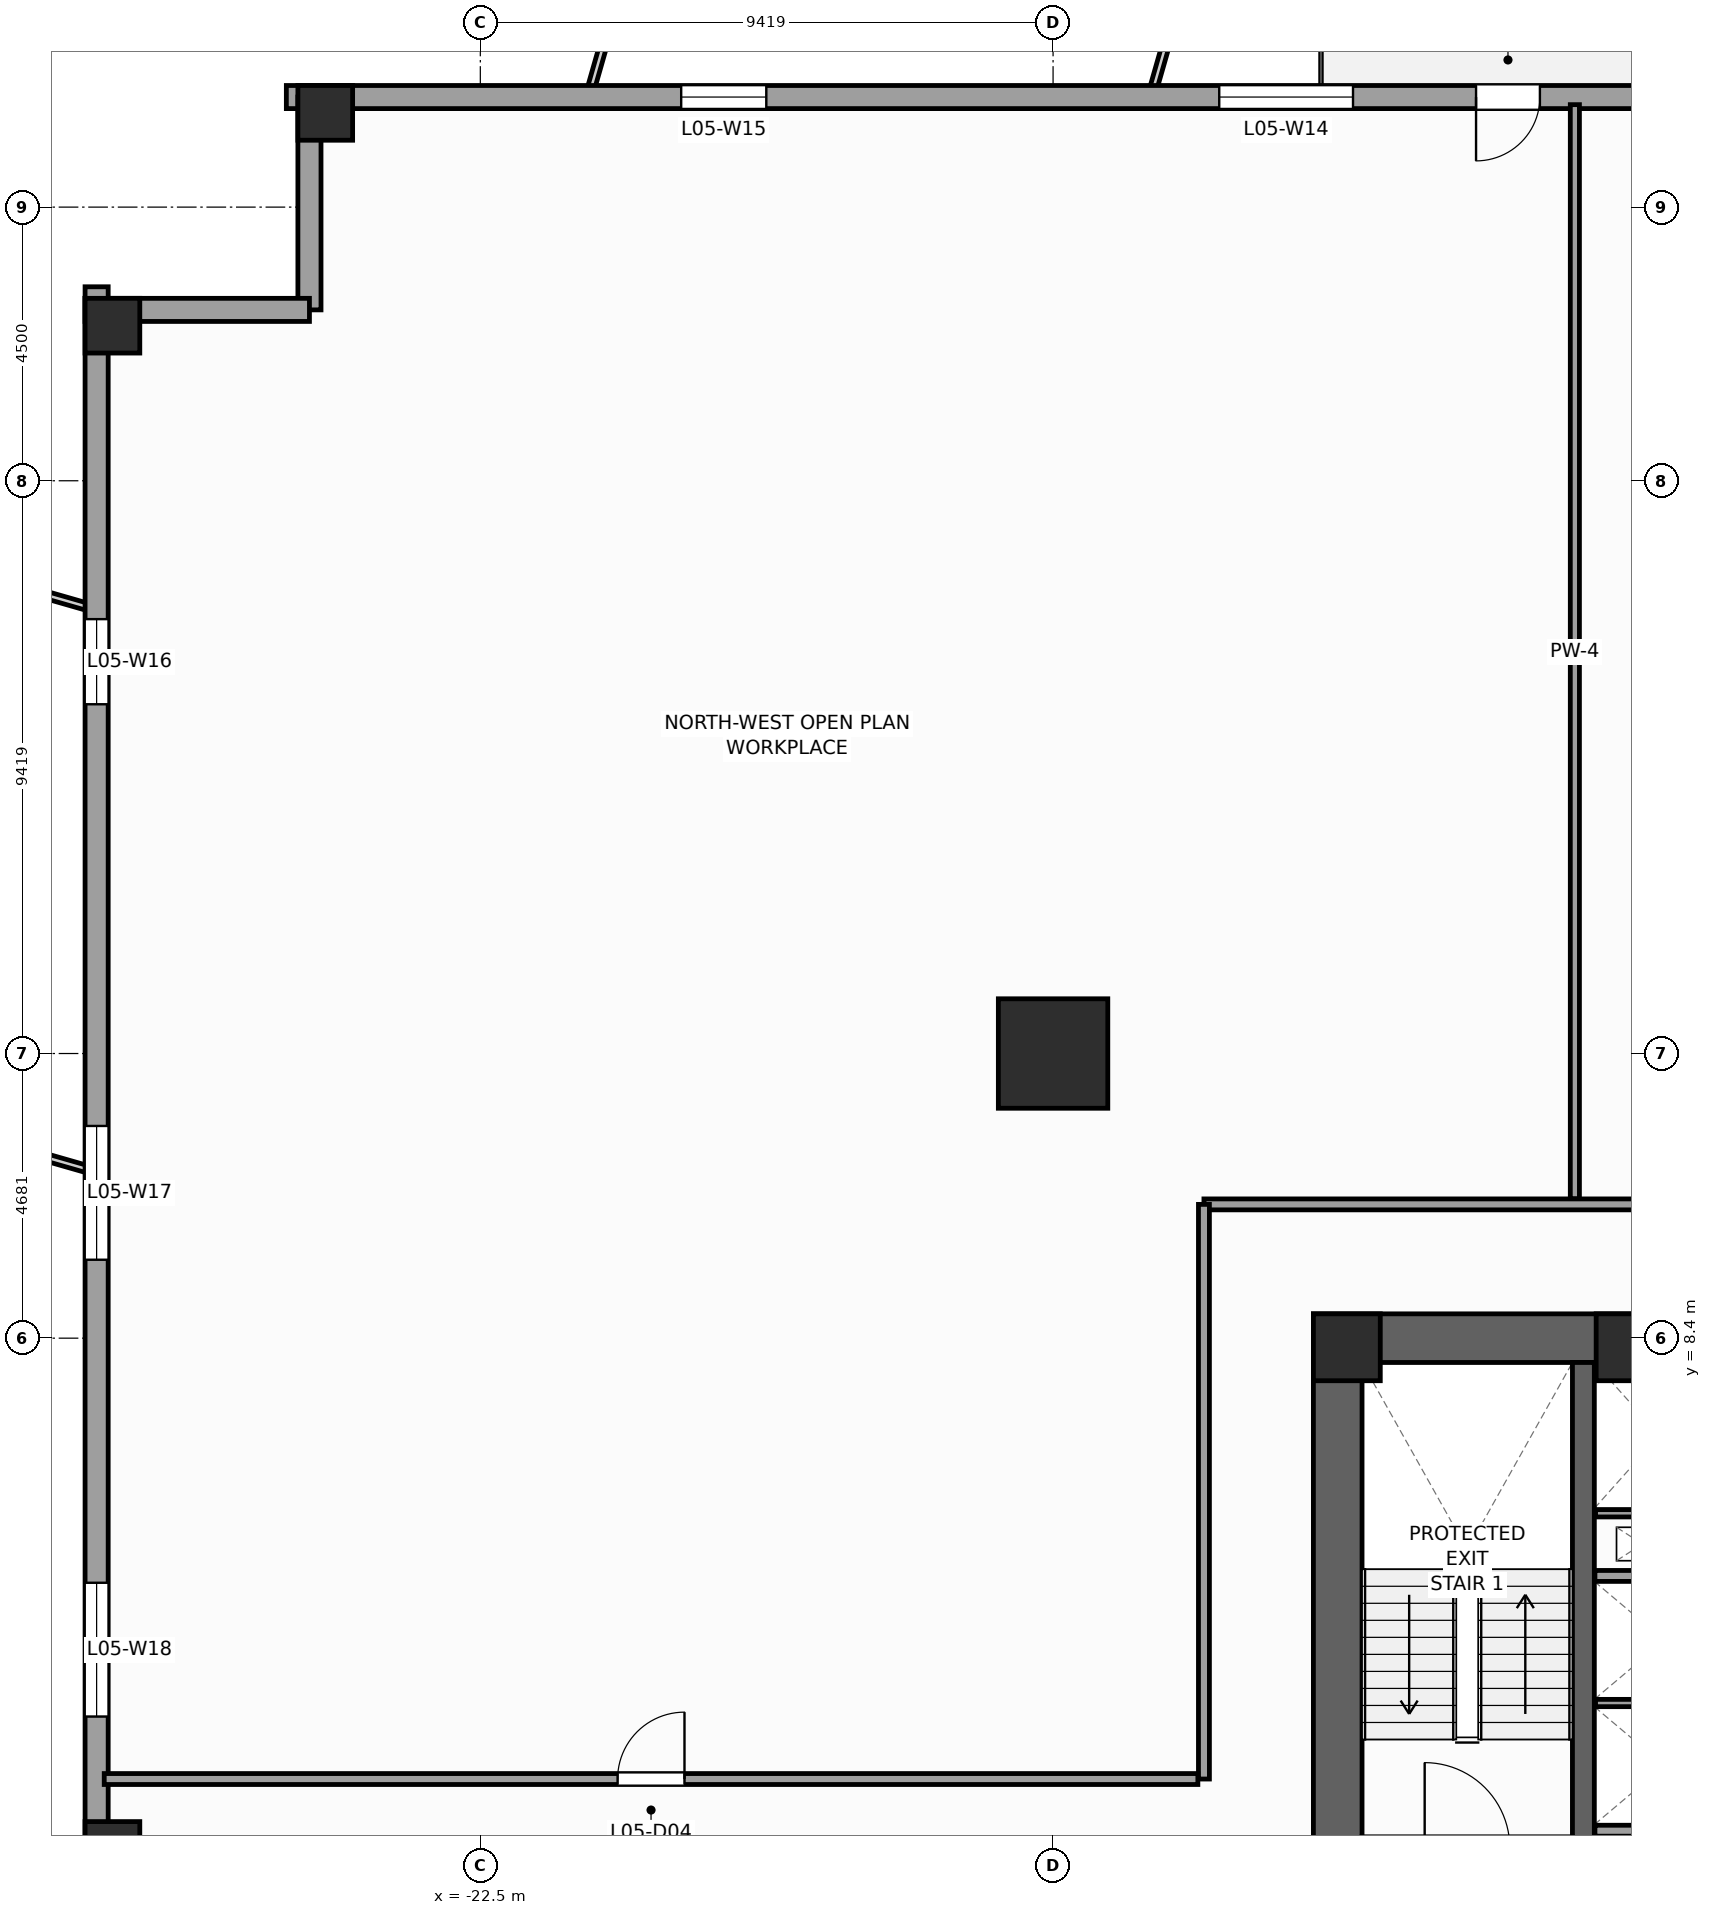
"""IFC4 building model, lengths in metres.
Left out: names, types, materials, properties, quantities, classifications, styles, units other than length and angle.
Written with IfcOpenShell. Run it as: python <this file> out.ifc"""

import sys

from ifc_helpers import new_model, si_unit, direction, frame, frame_2d, origin, origin_2d, place, context, subcontext, project, spatial, rectangle, extrude, source, transform, mapped, element, fill, save


model = new_model("IFC4")
c1 = context("Model", 3, precision=1e-05, world=origin(), true_north=direction((0.0, 1.0)))
c2 = subcontext(c1, "Body", "Model", "MODEL_VIEW")
j1 = project(units=[si_unit("LENGTHUNIT", "METRE"), si_unit("PLANEANGLEUNIT", "RADIAN")], contexts=[c1])
p1 = place(None, origin())
s1 = spatial("IfcSite", under=j1, at=p1, CompositionType="ELEMENT")
p2 = place(p1, origin())
s2 = spatial("IfcBuilding", under=s1, at=p2, CompositionType="ELEMENT")
p3 = place(p2, frame((0.0, 0.0, 26.0)))
s3 = spatial("IfcBuildingStorey", under=s2, at=p3, CompositionType="ELEMENT", Elevation=26.0)
p4 = place(p3, frame((-8.8, 8.4, 0.0), z_axis=(0.0, 0.0, 1.0), x_axis=(1.0, 0.0, 0.0)))
e1 = element("IfcWall", 1, at=p4, inside=s3, PredefinedType="SHEAR", context=c2, shape_type="SweptSolid", body=[
    extrude(rectangle(XDim=17.6, YDim=0.8, at=frame_2d((8.8, 0.0))), origin(), (0.0, 0.0, 1.0), 4.0),
])
p5 = place(p3, frame((-8.4, -8.0, 0.0), z_axis=(0.0, 0.0, 1.0), x_axis=(0.0, 1.0, 0.0)))
e2 = element("IfcWall", 2, at=p5, inside=s3, PredefinedType="SHEAR", context=c2, shape_type="SweptSolid", body=[
    extrude(rectangle(XDim=16.0, YDim=0.8, at=frame_2d((8.0, 0.0))), origin(), (0.0, 0.0, 1.0), 4.0),
])
p6 = place(p5, frame((4.69, 0.0, 0.0)))
e3 = element("IfcOpeningElement", 3, at=p6, cuts=e2, PredefinedType="OPENING", context=c2, shape_type="SweptSolid", body=[
    extrude(rectangle(XDim=1.3, YDim=2.2, at=frame_2d((0.65, 1.1))), frame((0.0, 0.41, 0.0), z_axis=(0.0, -1.0, 0.0), x_axis=(1.0, 0.0, 0.0)), (0.0, 0.0, 1.0), 0.82),
])
p7 = place(p3, frame((-4.36, -8.0, 0.0), z_axis=(0.0, 0.0, 1.0), x_axis=(0.0, 1.0, 0.0)))
e4 = element("IfcWall", 4, at=p7, inside=s3, PredefinedType="SHEAR", context=c2, shape_type="SweptSolid", body=[
    extrude(rectangle(XDim=16.0, YDim=0.36, at=frame_2d((8.0, 0.0))), origin(), (0.0, 0.0, 1.0), 4.0),
])
m1 = source(origin(), c2, "Body", "SweptSolid", [
    extrude(rectangle(XDim=1.1, YDim=1.1, at=origin_2d()), origin(), (0.0, 0.0, 1.0), 4.0),
])
for number, where, z_axis, x_axis in (
    (5, (-8.25, 8.25, 0.0), (0.0, 0.0, 1.0), (1.0, 0.0, 0.0)),
    (6, (-3.6, 8.25, 0.0), (0.0, 0.0, 1.0), (1.0, 0.0, 0.0)),
):
    element("IfcColumn", number, at=place(p3, frame(where, z_axis=z_axis, x_axis=x_axis)), inside=s3, PredefinedType="PILASTER", context=c2, shape_type="MappedRepresentation", body=[
        mapped(m1, transform((0.0, 0.0, 0.0), scale=1.0)),
    ])
m2 = source(origin(), c2, "Body", "SweptSolid", [
    extrude(rectangle(XDim=1.8, YDim=1.8, at=origin_2d()), origin(), (0.0, 0.0, 1.0), 4.0),
])
p8 = place(p3, frame((-13.081, 13.081, 0.0), z_axis=(0.0, 0.0, 1.0), x_axis=(1.0, 0.0, 0.0)))
e7 = element("IfcColumn", 7, at=p8, inside=s3, PredefinedType="COLUMN", context=c2, shape_type="MappedRepresentation", body=[
    mapped(m2, transform((0.0, 0.0, 0.0), scale=1.0)),
])
m3 = source(origin(), c2, "Body", "SweptSolid", [
    extrude(rectangle(XDim=0.9, YDim=0.9, at=origin_2d()), origin(), (0.0, 0.0, 1.0), 4.0),
])
for number, where, z_axis, x_axis in (
    (8, (-25.05, 28.55, 0.0), (0.0, 0.0, 1.0), (1.0, 0.0, 0.0)),
    (9, (-28.55, 25.05, 0.0), (0.0, 0.0, 1.0), (1.0, 0.0, 0.0)),
    (10, (-28.55, 0.0, 0.0), (0.0, 0.0, 1.0), (1.0, 0.0, 0.0)),
):
    element("IfcColumn", number, at=place(p3, frame(where, z_axis=z_axis, x_axis=x_axis)), inside=s3, PredefinedType="COLUMN", context=c2, shape_type="MappedRepresentation", body=[
        mapped(m3, transform((0.0, 0.0, 0.0), scale=1.0)),
    ])
p9 = place(p3, frame((25.69, 28.81, 0.0), z_axis=(0.0, 0.0, 1.0), x_axis=(-1.0, 0.0, 0.0)))
e11 = element("IfcWall", 11, at=p9, inside=s3, PredefinedType="STANDARD", context=c2, shape_type="SweptSolid", body=[
    extrude(rectangle(XDim=51.38, YDim=0.38, at=frame_2d((25.69, 0.0))), origin(), (0.0, 0.0, 1.0), 3.12),
])
p10 = place(p9, frame((30.765, 0.0, 0.0)))
e12 = element("IfcOpeningElement", 12, at=p10, cuts=e11, PredefinedType="OPENING", context=c2, shape_type="SweptSolid", body=[
    extrude(rectangle(XDim=1.05, YDim=2.25, at=frame_2d((0.525, 1.125))), frame((0.0, 0.2, 0.0), z_axis=(0.0, -1.0, 0.0), x_axis=(1.0, 0.0, 0.0)), (0.0, 0.0, 1.0), 0.4),
])
p11 = place(p9, frame((5.466, 0.0, 0.49)))
e13 = element("IfcOpeningElement", 13, at=p11, cuts=e11, PredefinedType="OPENING", context=c2, shape_type="SweptSolid", body=[
    extrude(rectangle(XDim=1.4, YDim=2.4, at=frame_2d((0.7, 1.2))), frame((0.0, 0.2, 0.0), z_axis=(0.0, -1.0, 0.0), x_axis=(1.0, 0.0, 0.0)), (0.0, 0.0, 1.0), 0.4),
])
p12 = place(p9, frame((13.8, 0.0, 0.49)))
e14 = element("IfcOpeningElement", 14, at=p12, cuts=e11, PredefinedType="OPENING", context=c2, shape_type="SweptSolid", body=[
    extrude(rectangle(XDim=2.2, YDim=2.4, at=frame_2d((1.1, 1.2))), frame((0.0, 0.2, 0.0), z_axis=(0.0, -1.0, 0.0), x_axis=(1.0, 0.0, 0.0)), (0.0, 0.0, 1.0), 0.4),
])
p13 = place(p9, frame((22.062, 0.0, 0.49)))
e15 = element("IfcOpeningElement", 15, at=p13, cuts=e11, PredefinedType="OPENING", context=c2, shape_type="SweptSolid", body=[
    extrude(rectangle(XDim=2.2, YDim=2.4, at=frame_2d((1.1, 1.2))), frame((0.0, 0.2, 0.0), z_axis=(0.0, -1.0, 0.0), x_axis=(1.0, 0.0, 0.0)), (0.0, 0.0, 1.0), 0.4),
])
p14 = place(p9, frame((33.838, 0.0, 0.49)))
e16 = element("IfcOpeningElement", 16, at=p14, cuts=e11, PredefinedType="OPENING", context=c2, shape_type="SweptSolid", body=[
    extrude(rectangle(XDim=2.2, YDim=2.4, at=frame_2d((1.1, 1.2))), frame((0.0, 0.2, 0.0), z_axis=(0.0, -1.0, 0.0), x_axis=(1.0, 0.0, 0.0)), (0.0, 0.0, 1.0), 0.4),
])
p15 = place(p9, frame((43.487, 0.0, 0.49)))
e17 = element("IfcOpeningElement", 17, at=p15, cuts=e11, PredefinedType="OPENING", context=c2, shape_type="SweptSolid", body=[
    extrude(rectangle(XDim=1.4, YDim=2.4, at=frame_2d((0.7, 1.2))), frame((0.0, 0.2, 0.0), z_axis=(0.0, -1.0, 0.0), x_axis=(1.0, 0.0, 0.0)), (0.0, 0.0, 1.0), 0.4),
])
p16 = place(p3, frame((-25.31, 28.81, 0.0), z_axis=(0.0, 0.0, 1.0), x_axis=(0.0, -1.0, 0.0)))
e18 = element("IfcWall", 18, at=p16, inside=s3, PredefinedType="STANDARD", context=c2, shape_type="SweptSolid", body=[
    extrude(rectangle(XDim=3.5, YDim=0.38, at=frame_2d((1.75, 0.0))), origin(), (0.0, 0.0, 1.0), 3.72),
])
p17 = place(p3, frame((-25.31, 25.31, 0.0), z_axis=(0.0, 0.0, 1.0), x_axis=(-1.0, 0.0, 0.0)))
e19 = element("IfcWall", 19, at=p17, inside=s3, PredefinedType="STANDARD", context=c2, shape_type="SweptSolid", body=[
    extrude(rectangle(XDim=3.69, YDim=0.38, at=frame_2d((1.845, 0.0))), origin(), (0.0, 0.0, 1.0), 3.72),
])
p18 = place(p3, frame((-28.81, 25.69, 0.0), z_axis=(0.0, 0.0, 1.0), x_axis=(0.0, -1.0, 0.0)))
e20 = element("IfcWall", 20, at=p18, inside=s3, PredefinedType="STANDARD", context=c2, shape_type="SweptSolid", body=[
    extrude(rectangle(XDim=51.38, YDim=0.38, at=frame_2d((25.69, 0.0))), origin(), (0.0, 0.0, 1.0), 3.12),
])
p19 = place(p18, frame((5.466, 0.0, 0.49)))
e21 = element("IfcOpeningElement", 21, at=p19, cuts=e20, PredefinedType="OPENING", context=c2, shape_type="SweptSolid", body=[
    extrude(rectangle(XDim=1.4, YDim=2.4, at=frame_2d((0.7, 1.2))), frame((0.0, 0.2, 0.0), z_axis=(0.0, -1.0, 0.0), x_axis=(1.0, 0.0, 0.0)), (0.0, 0.0, 1.0), 0.4),
])
p20 = place(p18, frame((13.8, 0.0, 0.49)))
e22 = element("IfcOpeningElement", 22, at=p20, cuts=e20, PredefinedType="OPENING", context=c2, shape_type="SweptSolid", body=[
    extrude(rectangle(XDim=2.2, YDim=2.4, at=frame_2d((1.1, 1.2))), frame((0.0, 0.2, 0.0), z_axis=(0.0, -1.0, 0.0), x_axis=(1.0, 0.0, 0.0)), (0.0, 0.0, 1.0), 0.4),
])
p21 = place(p18, frame((21.312, 0.0, 0.49)))
e23 = element("IfcOpeningElement", 23, at=p21, cuts=e20, PredefinedType="OPENING", context=c2, shape_type="SweptSolid", body=[
    extrude(rectangle(XDim=2.2, YDim=2.4, at=frame_2d((1.1, 1.2))), frame((0.0, 0.2, 0.0), z_axis=(0.0, -1.0, 0.0), x_axis=(1.0, 0.0, 0.0)), (0.0, 0.0, 1.0), 0.4),
])
p22 = place(p18, frame((33.838, 0.0, 0.49)))
e24 = element("IfcOpeningElement", 24, at=p22, cuts=e20, PredefinedType="OPENING", context=c2, shape_type="SweptSolid", body=[
    extrude(rectangle(XDim=2.2, YDim=2.4, at=frame_2d((1.1, 1.2))), frame((0.0, 0.2, 0.0), z_axis=(0.0, -1.0, 0.0), x_axis=(1.0, 0.0, 0.0)), (0.0, 0.0, 1.0), 0.4),
])
p23 = place(p18, frame((43.487, 0.0, 0.49)))
e25 = element("IfcOpeningElement", 25, at=p23, cuts=e20, PredefinedType="OPENING", context=c2, shape_type="SweptSolid", body=[
    extrude(rectangle(XDim=1.4, YDim=2.4, at=frame_2d((0.7, 1.2))), frame((0.0, 0.2, 0.0), z_axis=(0.0, -1.0, 0.0), x_axis=(1.0, 0.0, 0.0)), (0.0, 0.0, 1.0), 0.4),
])
for number, where, z_axis, x_axis in (
    (26, (-4.17, 0.3, 0.0), (0.0, 0.0, 1.0), (1.0, 0.0, 0.0)),
    (27, (-4.17, 4.49, 0.0), (0.0, 0.0, 1.0), (1.0, 0.0, 0.0)),
):
    element("IfcWall", number, at=place(p3, frame(where, z_axis=z_axis, x_axis=x_axis)), inside=s3, PredefinedType="PARTITIONING", context=c2, shape_type="SweptSolid", body=[
        extrude(rectangle(XDim=2.28, YDim=0.18, at=frame_2d((1.14, 0.0))), origin(), (0.0, 0.0, 1.0), 3.72),
    ])
p24 = place(p3, frame((-4.16, 2.4, 0.0), z_axis=(0.0, 0.0, 1.0), x_axis=(1.0, 0.0, 0.0)))
e28 = element("IfcWall", 28, at=p24, inside=s3, PredefinedType="PARTITIONING", context=c2, shape_type="SweptSolid", body=[
    extrude(rectangle(XDim=2.26, YDim=0.12, at=frame_2d((1.13, 0.0))), origin(), (0.0, 0.0, 1.0), 3.72),
])
p25 = place(p3, frame((-4.16, 5.52, 0.0), z_axis=(0.0, 0.0, 1.0), x_axis=(1.0, 0.0, 0.0)))
e29 = element("IfcWall", 29, at=p25, inside=s3, PredefinedType="PARTITIONING", context=c2, shape_type="SweptSolid", body=[
    extrude(rectangle(XDim=2.1, YDim=0.12, at=frame_2d((1.05, 0.0))), origin(), (0.0, 0.0, 1.0), 3.72),
])
p26 = place(p3, frame((-10.6, 10.6, 0.0), z_axis=(0.0, 0.0, 1.0), x_axis=(1.0, 0.0, 0.0)))
e30 = element("IfcWall", 30, at=p26, inside=s3, PredefinedType="PARTITIONING", context=c2, shape_type="SweptSolid", body=[
    extrude(rectangle(XDim=21.2, YDim=0.18, at=frame_2d((10.6, 0.0))), origin(), (0.0, 0.0, 1.0), 3.72),
])
p27 = place(p26, frame((10.05, 0.0, 0.0)))
e31 = element("IfcOpeningElement", 31, at=p27, cuts=e30, PredefinedType="OPENING", context=c2, shape_type="SweptSolid", body=[
    extrude(rectangle(XDim=1.1, YDim=2.2, at=frame_2d((0.55, 1.1))), frame((0.0, 0.1, 0.0), z_axis=(0.0, -1.0, 0.0), x_axis=(1.0, 0.0, 0.0)), (0.0, 0.0, 1.0), 0.2),
])
p28 = place(p3, frame((-10.6, 1.15, 0.0), z_axis=(0.0, 0.0, 1.0), x_axis=(0.0, 1.0, 0.0)))
e32 = element("IfcWall", 32, at=p28, inside=s3, PredefinedType="PARTITIONING", context=c2, shape_type="SweptSolid", body=[
    extrude(rectangle(XDim=9.45, YDim=0.18, at=frame_2d((4.725, 0.0))), origin(), (0.0, 0.0, 1.0), 3.72),
])
p29 = place(p3, frame((-28.685, 1.15, 0.0), z_axis=(0.0, 0.0, 1.0), x_axis=(1.0, 0.0, 0.0)))
e33 = element("IfcWall", 33, at=p29, inside=s3, PredefinedType="PARTITIONING", context=c2, shape_type="SweptSolid", body=[
    extrude(rectangle(XDim=17.985, YDim=0.18, at=frame_2d((8.993, 0.0))), origin(), (0.0, 0.0, 1.0), 3.72),
])
p30 = place(p29, frame((8.442, 0.0, 0.0)))
e34 = element("IfcOpeningElement", 34, at=p30, cuts=e33, PredefinedType="OPENING", context=c2, shape_type="SweptSolid", body=[
    extrude(rectangle(XDim=1.1, YDim=2.2, at=frame_2d((0.55, 1.1))), frame((0.0, 0.1, 0.0), z_axis=(0.0, -1.0, 0.0), x_axis=(1.0, 0.0, 0.0)), (0.0, 0.0, 1.0), 0.2),
])
p31 = place(p3, frame((-4.5, 10.695, 0.0), z_axis=(0.0, 0.0, 1.0), x_axis=(0.0, 1.0, 0.0)))
e35 = element("IfcWall", 35, at=p31, inside=s3, PredefinedType="PARTITIONING", context=c2, shape_type="SweptSolid", body=[
    extrude(rectangle(XDim=17.99, YDim=0.15, at=frame_2d((8.995, 0.0))), origin(), (0.0, 0.0, 1.0), 3.72),
])
m4 = source(origin(), c2, "Body", "SweptSolid", [
    extrude(rectangle(XDim=1.05, YDim=2.25, at=frame_2d((0.525, 1.125))), frame((0.0, 0.025, 0.0), z_axis=(0.0, -1.0, 0.0), x_axis=(1.0, 0.0, 0.0)), (0.0, 0.0, 1.0), 0.05),
])
p32 = place(p10, origin())
e36 = element("IfcDoor", 36, at=p32, inside=s3, OperationType="SINGLE_SWING_RIGHT", PredefinedType="DOOR", context=c2, shape_type="MappedRepresentation", body=[
    mapped(m4, transform((0.0, 0.0, 0.0), scale=1.0)),
])
fill(e12, e36)
m5 = source(origin(), c2, "Body", "SweptSolid", [
    extrude(rectangle(XDim=2.2, YDim=2.4, at=frame_2d((1.1, 1.2))), frame((0.0, 0.03, 0.0), z_axis=(0.0, -1.0, 0.0), x_axis=(1.0, 0.0, 0.0)), (0.0, 0.0, 1.0), 0.06),
])
p33 = place(p14, origin())
e37 = element("IfcWindow", 37, at=p33, inside=s3, PartitioningType="SINGLE_PANEL", PredefinedType="WINDOW", context=c2, shape_type="MappedRepresentation", body=[
    mapped(m5, transform((0.0, 0.0, 0.0), scale=1.0)),
])
fill(e16, e37)
m6 = source(origin(), c2, "Body", "SweptSolid", [
    extrude(rectangle(XDim=1.4, YDim=2.4, at=frame_2d((0.7, 1.2))), frame((0.0, 0.03, 0.0), z_axis=(0.0, -1.0, 0.0), x_axis=(1.0, 0.0, 0.0)), (0.0, 0.0, 1.0), 0.06),
])
p34 = place(p15, origin())
e38 = element("IfcWindow", 38, at=p34, inside=s3, PartitioningType="SINGLE_PANEL", PredefinedType="WINDOW", context=c2, shape_type="MappedRepresentation", body=[
    mapped(m6, transform((0.0, 0.0, 0.0), scale=1.0)),
])
fill(e17, e38)
p35 = place(p19, origin())
e39 = element("IfcWindow", 39, at=p35, inside=s3, PartitioningType="SINGLE_PANEL", PredefinedType="WINDOW", context=c2, shape_type="MappedRepresentation", body=[
    mapped(m6, transform((0.0, 0.0, 0.0), scale=1.0)),
])
fill(e21, e39)
p36 = place(p20, origin())
e40 = element("IfcWindow", 40, at=p36, inside=s3, PartitioningType="SINGLE_PANEL", PredefinedType="WINDOW", context=c2, shape_type="MappedRepresentation", body=[
    mapped(m5, transform((0.0, 0.0, 0.0), scale=1.0)),
])
fill(e22, e40)
p37 = place(p21, origin())
e41 = element("IfcWindow", 41, at=p37, inside=s3, PartitioningType="SINGLE_PANEL", PredefinedType="WINDOW", context=c2, shape_type="MappedRepresentation", body=[
    mapped(m5, transform((0.0, 0.0, 0.0), scale=1.0)),
])
fill(e23, e41)
m7 = source(origin(), c2, "Body", "SweptSolid", [
    extrude(rectangle(XDim=1.1, YDim=2.2, at=frame_2d((0.55, 1.1))), frame((0.0, 0.025, 0.0), z_axis=(0.0, -1.0, 0.0), x_axis=(1.0, 0.0, 0.0)), (0.0, 0.0, 1.0), 0.05),
])
p38 = place(p30, origin())
e42 = element("IfcDoor", 42, at=p38, inside=s3, OperationType="SINGLE_SWING_RIGHT", PredefinedType="DOOR", context=c2, shape_type="MappedRepresentation", body=[
    mapped(m7, transform((0.0, 0.0, 0.0), scale=1.0)),
])
fill(e34, e42)
save(model, sys.argv[1])
